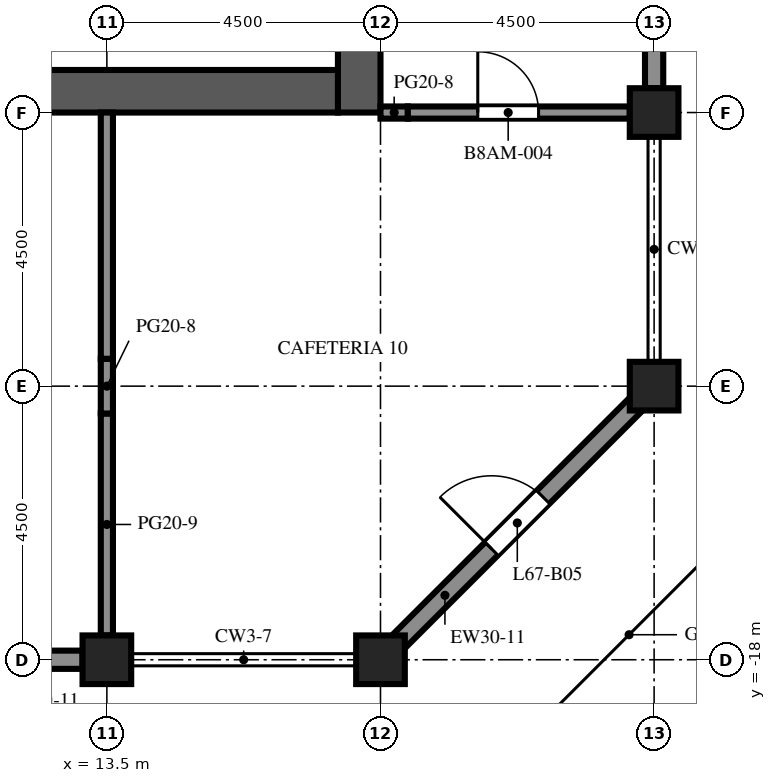
"""IFC4 building model, lengths in metres.
Left out: names, types, materials, properties, quantities, classifications, styles, units other than length and angle.
Written with IfcOpenShell. Run it as: python <this file> out.ifc"""

import sys

from ifc_helpers import new_model, si_unit, direction, frame, frame_2d, origin, origin_2d, place, context, subcontext, project, spatial, rectangle, extrude, element, fill, save


model = new_model("IFC4")
c1 = context("Model", 3, precision=1e-05, world=origin(), true_north=direction((0.0, 1.0)))
c2 = subcontext(c1, "Body", "Model", "MODEL_VIEW")
j1 = project(units=[si_unit("LENGTHUNIT", "METRE"), si_unit("PLANEANGLEUNIT", "RADIAN")], contexts=[c1])
p1 = place(None, origin())
s1 = spatial("IfcSite", under=j1, at=p1, CompositionType="ELEMENT")
p2 = place(p1, origin())
s2 = spatial("IfcBuilding", under=s1, at=p2, CompositionType="ELEMENT")
p3 = place(p2, frame((0.0, 0.0, 295.0)))
s3 = spatial("IfcBuildingStorey", under=s2, at=p3, CompositionType="ELEMENT", Elevation=295.0)
p4 = place(p3, frame((13.5, -18.0, 0.0), z_axis=(0.0, 0.0, 1.0), x_axis=(1.0, 0.0, 0.0)))
e1 = element("IfcColumn", 1, at=p4, inside=s3, PredefinedType="COLUMN", context=c2, shape_type="SweptSolid", body=[
    extrude(rectangle(XDim=0.8, YDim=0.8, at=origin_2d()), origin(), (0.0, 0.0, 1.0), 6.0),
])
p5 = place(p3, frame((18.0, -18.0, 0.0), z_axis=(0.0, 0.0, 1.0), x_axis=(1.0, 0.0, 0.0)))
e2 = element("IfcColumn", 2, at=p5, inside=s3, PredefinedType="COLUMN", context=c2, shape_type="SweptSolid", body=[
    extrude(rectangle(XDim=0.8, YDim=0.8, at=origin_2d()), origin(), (0.0, 0.0, 1.0), 3.6),
])
for number, where, z_axis, x_axis in (
    (3, (22.5, -13.5, 0.0), (0.0, 0.0, 1.0), (1.0, 0.0, 0.0)),
    (4, (22.5, -9.0, 0.0), (0.0, 0.0, 1.0), (1.0, 0.0, 0.0)),
):
    element("IfcColumn", number, at=place(p3, frame(where, z_axis=z_axis, x_axis=x_axis)), inside=s3, PredefinedType="COLUMN", context=c2, shape_type="SweptSolid", body=[
        extrude(rectangle(XDim=0.8, YDim=0.8, at=origin_2d()), origin(), (0.0, 0.0, 1.0), 6.0),
    ])
p6 = place(p3, frame((17.65, -9.0, 0.0), z_axis=(0.0, 0.0, 1.0), x_axis=(0.0, 1.0, 0.0)))
e5 = element("IfcWall", 5, at=p6, inside=s3, PredefinedType="SHEAR", context=c2, shape_type="SweptSolid", body=[
    extrude(rectangle(XDim=27.5, YDim=0.7, at=frame_2d((13.75, 0.0))), origin(), (0.0, 0.0, 1.0), 6.0),
])
p7 = place(p6, frame((12.55, 0.0, 0.0)))
e6 = element("IfcOpeningElement", 6, at=p7, cuts=e5, PredefinedType="OPENING", context=c2, shape_type="SweptSolid", body=[
    extrude(rectangle(XDim=2.4, YDim=2.4, at=frame_2d((1.2, 1.2))), frame((0.0, 0.36, 0.0), z_axis=(0.0, -1.0, 0.0), x_axis=(1.0, 0.0, 0.0)), (0.0, 0.0, 1.0), 0.72),
])
p8 = place(p6, frame((6.825, 0.0, 0.0)))
e7 = element("IfcOpeningElement", 7, at=p8, cuts=e5, PredefinedType="OPENING", context=c2, shape_type="SweptSolid", body=[
    extrude(rectangle(XDim=1.2, YDim=2.1, at=frame_2d((0.6, 1.05))), frame((0.0, 0.36, 0.0), z_axis=(0.0, -1.0, 0.0), x_axis=(1.0, 0.0, 0.0)), (0.0, 0.0, 1.0), 0.72),
])
p9 = place(p6, frame((19.475, 0.0, 0.0)))
e8 = element("IfcOpeningElement", 8, at=p9, cuts=e5, PredefinedType="OPENING", context=c2, shape_type="SweptSolid", body=[
    extrude(rectangle(XDim=1.2, YDim=2.1, at=frame_2d((0.6, 1.05))), frame((0.0, 0.36, 0.0), z_axis=(0.0, -1.0, 0.0), x_axis=(1.0, 0.0, 0.0)), (0.0, 0.0, 1.0), 0.72),
])
p10 = place(p3, frame((6.7, -8.65, 0.0), z_axis=(0.0, 0.0, 1.0), x_axis=(1.0, 0.0, 0.0)))
e9 = element("IfcWall", 9, at=p10, inside=s3, PredefinedType="SHEAR", context=c2, shape_type="SweptSolid", body=[
    extrude(rectangle(XDim=10.6, YDim=0.7, at=frame_2d((5.3, 0.0))), origin(), (0.0, 0.0, 1.0), 6.0),
])
p11 = place(p3, frame((13.1, -18.0, 0.0), z_axis=(0.0, 0.0, 1.0), x_axis=(-1.0, 0.0, 0.0)))
e10 = element("IfcWall", 10, at=p11, inside=s3, PredefinedType="SOLIDWALL", context=c2, shape_type="SweptSolid", body=[
    extrude(rectangle(XDim=3.7, YDim=0.3, at=frame_2d((1.85, 0.0))), origin(), (0.0, 0.0, 1.0), 3.6),
])
p12 = place(p11, frame((1.35, 0.0, 0.0)))
e11 = element("IfcOpeningElement", 11, at=p12, cuts=e10, PredefinedType="OPENING", context=c2, shape_type="SweptSolid", body=[
    extrude(rectangle(XDim=1.0, YDim=2.2, at=frame_2d((0.5, 1.1))), frame((0.0, 0.16, 0.0), z_axis=(0.0, -1.0, 0.0), x_axis=(1.0, 0.0, 0.0)), (0.0, 0.0, 1.0), 0.32),
])
p13 = place(p3, frame((22.206, -13.794, 0.0), z_axis=(0.0, 0.0, 1.0), x_axis=(-0.707106781187, -0.707106781187, 0.0)))
e12 = element("IfcWall", 12, at=p13, inside=s3, PredefinedType="SOLIDWALL", context=c2, shape_type="SweptSolid", body=[
    extrude(rectangle(XDim=5.532, YDim=0.3, at=frame_2d((2.766, 0.0))), origin(), (0.0, 0.0, 1.0), 3.6),
])
p14 = place(p13, frame((2.166, 0.0, 0.0)))
e13 = element("IfcOpeningElement", 13, at=p14, cuts=e12, PredefinedType="OPENING", context=c2, shape_type="SweptSolid", body=[
    extrude(rectangle(XDim=1.2, YDim=2.2, at=frame_2d((0.6, 1.1))), frame((0.0, 0.16, 0.0), z_axis=(0.0, -1.0, 0.0), x_axis=(1.0, 0.0, 0.0)), (0.0, 0.0, 1.0), 0.32),
])
p15 = place(p3, frame((22.5, -4.9, 0.0), z_axis=(0.0, 0.0, 1.0), x_axis=(0.0, -1.0, 0.0)))
e14 = element("IfcWall", 14, at=p15, inside=s3, PredefinedType="SOLIDWALL", context=c2, shape_type="SweptSolid", body=[
    extrude(rectangle(XDim=3.7, YDim=0.3, at=frame_2d((1.85, 0.0))), origin(), (0.0, 0.0, 1.0), 4.6),
])
p16 = place(p15, frame((1.35, 0.0, 0.0)))
e15 = element("IfcOpeningElement", 15, at=p16, cuts=e14, PredefinedType="OPENING", context=c2, shape_type="SweptSolid", body=[
    extrude(rectangle(XDim=1.0, YDim=2.2, at=frame_2d((0.5, 1.1))), frame((0.0, 0.16, 0.0), z_axis=(0.0, -1.0, 0.0), x_axis=(1.0, 0.0, 0.0)), (0.0, 0.0, 1.0), 0.32),
])
p17 = place(p3, frame((13.5, -17.6, 0.0), z_axis=(0.0, 0.0, 1.0), x_axis=(0.0, 1.0, 0.0)))
e16 = element("IfcWall", 16, at=p17, inside=s3, PredefinedType="PARTITIONING", context=c2, shape_type="SweptSolid", body=[
    extrude(rectangle(XDim=3.65, YDim=0.2, at=frame_2d((1.825, 0.0))), origin(), (0.0, 0.0, 1.0), 4.77),
])
p18 = place(p3, frame((13.5, -13.95, 0.0), z_axis=(0.0, 0.0, 1.0), x_axis=(0.0, 1.0, 0.0)))
e17 = element("IfcWall", 17, at=p18, inside=s3, PredefinedType="PARTITIONING", context=c2, shape_type="SweptSolid", body=[
    extrude(rectangle(XDim=0.9, YDim=0.2, at=frame_2d((0.45, 0.0))), origin(), (0.0, 0.0, 1.0), 3.57),
])
p19 = place(p3, frame((13.5, -13.05, 0.0), z_axis=(0.0, 0.0, 1.0), x_axis=(0.0, 1.0, 0.0)))
e18 = element("IfcWall", 18, at=p19, inside=s3, PredefinedType="PARTITIONING", context=c2, shape_type="SweptSolid", body=[
    extrude(rectangle(XDim=4.05, YDim=0.2, at=frame_2d((2.025, 0.0))), origin(), (0.0, 0.0, 1.0), 5.4),
])
p20 = place(p3, frame((18.0, -9.0, 0.0), z_axis=(0.0, 0.0, 1.0), x_axis=(1.0, 0.0, 0.0)))
e19 = element("IfcWall", 19, at=p20, inside=s3, PredefinedType="PARTITIONING", context=c2, shape_type="SweptSolid", body=[
    extrude(rectangle(XDim=0.45, YDim=0.2, at=frame_2d((0.225, 0.0))), origin(), (0.0, 0.0, 1.0), 3.57),
])
p21 = place(p3, frame((22.1, -9.0, 0.0), z_axis=(0.0, 0.0, 1.0), x_axis=(-1.0, 0.0, 0.0)))
e20 = element("IfcWall", 20, at=p21, inside=s3, PredefinedType="PARTITIONING", context=c2, shape_type="SweptSolid", body=[
    extrude(rectangle(XDim=3.65, YDim=0.2, at=frame_2d((1.825, 0.0))), origin(), (0.0, 0.0, 1.0), 5.4),
])
p22 = place(p21, frame((1.5, 0.0, 0.0)))
e21 = element("IfcOpeningElement", 21, at=p22, cuts=e20, PredefinedType="OPENING", context=c2, shape_type="SweptSolid", body=[
    extrude(rectangle(XDim=1.0, YDim=2.1, at=frame_2d((0.5, 1.05))), frame((0.0, 0.11, 0.0), z_axis=(0.0, -1.0, 0.0), x_axis=(1.0, 0.0, 0.0)), (0.0, 0.0, 1.0), 0.22),
])
p23 = place(p14, origin())
e22 = element("IfcDoor", 22, at=p23, inside=s3, OperationType="SINGLE_SWING_RIGHT", PredefinedType="DOOR", context=c2, shape_type="SweptSolid", body=[
    extrude(rectangle(XDim=1.2, YDim=2.2, at=frame_2d((0.6, 1.1))), frame((0.0, 0.025, 0.0), z_axis=(0.0, -1.0, 0.0), x_axis=(1.0, 0.0, 0.0)), (0.0, 0.0, 1.0), 0.05),
])
fill(e13, e22)
p24 = place(p22, origin())
e23 = element("IfcDoor", 23, at=p24, inside=s3, OperationType="SINGLE_SWING_RIGHT", PredefinedType="DOOR", context=c2, shape_type="SweptSolid", body=[
    extrude(rectangle(XDim=1.0, YDim=2.1, at=frame_2d((0.5, 1.05))), frame((0.0, 0.025, 0.0), z_axis=(0.0, -1.0, 0.0), x_axis=(1.0, 0.0, 0.0)), (0.0, 0.0, 1.0), 0.05),
])
fill(e21, e23)
save(model, sys.argv[1])
